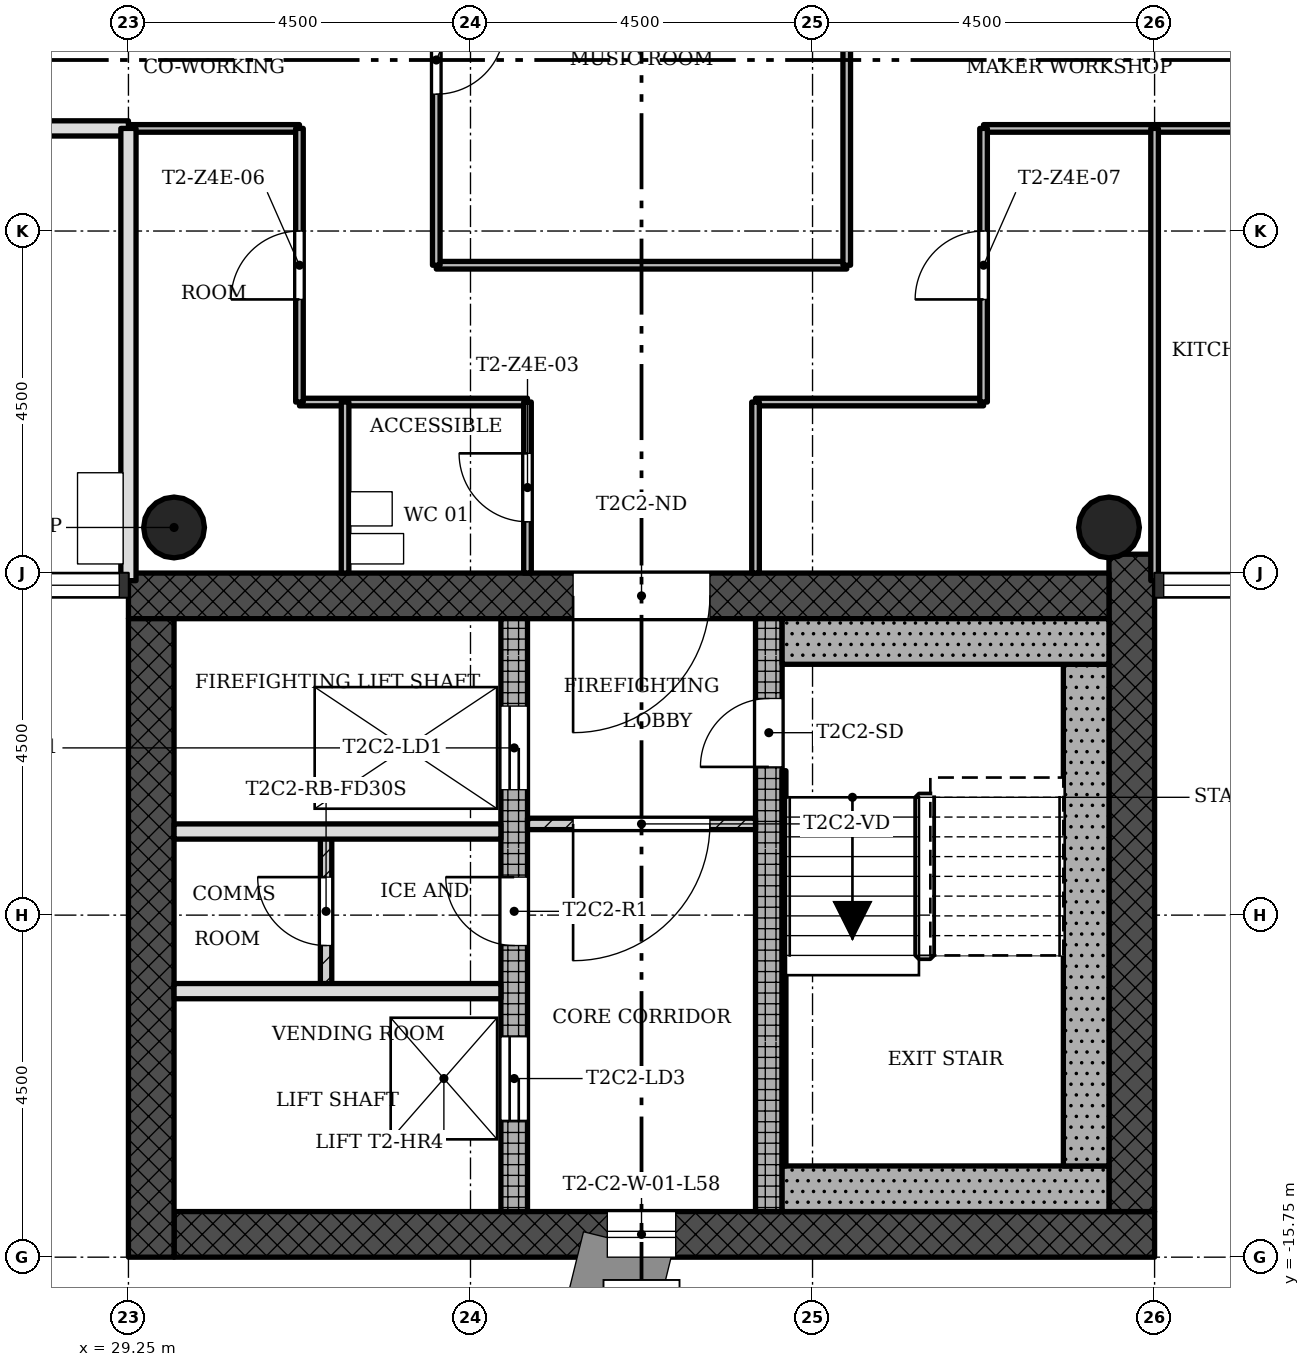
"""IFC4 building model, lengths in metres.
Left out: names, types, materials, properties, quantities, classifications, styles, units other than length and angle.
Written with IfcOpenShell. Run it as: python <this file> out.ifc"""

import sys

from ifc_helpers import new_model, si_unit, direction, frame, frame_2d, origin, origin_2d, place, context, subcontext, project, spatial, rectangle, hollow_circle, extrude, element, fill, save


model = new_model("IFC4")
c1 = context("Model", 3, precision=1e-05, world=origin(), true_north=direction((0.0, 1.0)))
c2 = subcontext(c1, "Body", "Model", "MODEL_VIEW")
j1 = project(units=[si_unit("LENGTHUNIT", "METRE"), si_unit("PLANEANGLEUNIT", "RADIAN")], contexts=[c1])
p1 = place(None, origin())
s1 = spatial("IfcSite", under=j1, at=p1, CompositionType="ELEMENT")
p2 = place(p1, origin())
s2 = spatial("IfcBuilding", under=s1, at=p2, CompositionType="ELEMENT")
p3 = place(p2, frame((0.0, 0.0, 209.6)))
s3 = spatial("IfcBuildingStorey", under=s2, at=p3, CompositionType="ELEMENT", Elevation=209.6)
p4 = place(p3, frame((29.85, -15.45, 0.0), z_axis=(0.0, 0.0, 1.0), x_axis=(1.0, 0.0, 0.0)))
e1 = element("IfcWall", 1, at=p4, inside=s3, PredefinedType="SHEAR", context=c2, shape_type="SweptSolid", body=[
    extrude(rectangle(XDim=12.9, YDim=0.6, at=frame_2d((6.45, 0.0))), origin(), (0.0, 0.0, 1.0), 3.4),
])
p5 = place(p4, frame((5.7, 0.0, 0.45)))
e2 = element("IfcOpeningElement", 2, at=p5, cuts=e1, PredefinedType="OPENING", context=c2, shape_type="SweptSolid", body=[
    extrude(rectangle(XDim=0.9, YDim=2.4, at=frame_2d((0.45, 1.2))), frame((0.0, 0.31, 0.0), z_axis=(0.0, -1.0, 0.0), x_axis=(1.0, 0.0, 0.0)), (0.0, 0.0, 1.0), 0.62),
])
p6 = place(p3, frame((42.45, -15.15, 0.0), z_axis=(0.0, 0.0, 1.0), x_axis=(0.0, 1.0, 0.0)))
e3 = element("IfcWall", 3, at=p6, inside=s3, PredefinedType="SHEAR", context=c2, shape_type="SweptSolid", body=[
    extrude(rectangle(XDim=8.648, YDim=0.6, at=frame_2d((4.324, 0.0))), origin(), (0.0, 0.0, 1.0), 3.4),
])
p7 = place(p3, frame((42.15, -7.05, 0.0), z_axis=(0.0, 0.0, 1.0), x_axis=(-1.0, 0.0, 0.0)))
e4 = element("IfcWall", 4, at=p7, inside=s3, PredefinedType="SHEAR", context=c2, shape_type="SweptSolid", body=[
    extrude(rectangle(XDim=12.9, YDim=0.6, at=frame_2d((6.45, 0.0))), origin(), (0.0, 0.0, 1.0), 3.4),
])
p8 = place(p7, frame((5.25, 0.0, 0.0)))
e5 = element("IfcOpeningElement", 5, at=p8, cuts=e4, PredefinedType="OPENING", context=c2, shape_type="SweptSolid", body=[
    extrude(rectangle(XDim=1.8, YDim=2.1, at=frame_2d((0.9, 1.05))), frame((0.0, 0.31, 0.0), z_axis=(0.0, -1.0, 0.0), x_axis=(1.0, 0.0, 0.0)), (0.0, 0.0, 1.0), 0.62),
])
p9 = place(p3, frame((29.55, -7.35, 0.0), z_axis=(0.0, 0.0, 1.0), x_axis=(0.0, -1.0, 0.0)))
e6 = element("IfcWall", 6, at=p9, inside=s3, PredefinedType="SHEAR", context=c2, shape_type="SweptSolid", body=[
    extrude(rectangle(XDim=8.4, YDim=0.6, at=frame_2d((4.2, 0.0))), origin(), (0.0, 0.0, 1.0), 3.4),
])
p10 = place(p3, frame((34.325, -15.15, 0.0), z_axis=(0.0, 0.0, 1.0), x_axis=(0.0, 1.0, 0.0)))
e7 = element("IfcWall", 7, at=p10, inside=s3, PredefinedType="SHEAR", context=c2, shape_type="SweptSolid", body=[
    extrude(rectangle(XDim=7.8, YDim=0.35, at=frame_2d((3.9, 0.0))), origin(), (0.0, 0.0, 1.0), 3.4),
])
p11 = place(p10, frame((5.55, 0.0, 0.0)))
e8 = element("IfcOpeningElement", 8, at=p11, cuts=e7, PredefinedType="OPENING", context=c2, shape_type="SweptSolid", body=[
    extrude(rectangle(XDim=1.1, YDim=2.1, at=frame_2d((0.55, 1.05))), frame((0.0, 0.185, 0.0), z_axis=(0.0, -1.0, 0.0), x_axis=(1.0, 0.0, 0.0)), (0.0, 0.0, 1.0), 0.37),
])
p12 = place(p10, frame((1.2, 0.0, 0.0)))
e9 = element("IfcOpeningElement", 9, at=p12, cuts=e7, PredefinedType="OPENING", context=c2, shape_type="SweptSolid", body=[
    extrude(rectangle(XDim=1.1, YDim=2.1, at=frame_2d((0.55, 1.05))), frame((0.0, 0.185, 0.0), z_axis=(0.0, -1.0, 0.0), x_axis=(1.0, 0.0, 0.0)), (0.0, 0.0, 1.0), 0.37),
])
p13 = place(p10, frame((3.5, 0.0, 0.0)))
e10 = element("IfcOpeningElement", 10, at=p13, cuts=e7, PredefinedType="OPENING", context=c2, shape_type="SweptSolid", body=[
    extrude(rectangle(XDim=0.9, YDim=2.1, at=frame_2d((0.45, 1.05))), frame((0.0, 0.185, 0.0), z_axis=(0.0, -1.0, 0.0), x_axis=(1.0, 0.0, 0.0)), (0.0, 0.0, 1.0), 0.37),
])
p14 = place(p3, frame((37.675, -15.15, 0.0), z_axis=(0.0, 0.0, 1.0), x_axis=(0.0, 1.0, 0.0)))
e11 = element("IfcWall", 11, at=p14, inside=s3, PredefinedType="SHEAR", context=c2, shape_type="SweptSolid", body=[
    extrude(rectangle(XDim=7.8, YDim=0.35, at=frame_2d((3.9, 0.0))), origin(), (0.0, 0.0, 1.0), 3.4),
])
p15 = place(p14, frame((5.85, 0.0, 0.0)))
e12 = element("IfcOpeningElement", 12, at=p15, cuts=e11, PredefinedType="OPENING", context=c2, shape_type="SweptSolid", body=[
    extrude(rectangle(XDim=0.9, YDim=2.1, at=frame_2d((0.45, 1.05))), frame((0.0, 0.185, 0.0), z_axis=(0.0, -1.0, 0.0), x_axis=(1.0, 0.0, 0.0)), (0.0, 0.0, 1.0), 0.37),
])
for number, where, z_axis, x_axis in (
    (13, (42.15, -6.15, 0.0), (0.0, 0.0, 1.0), (1.0, 0.0, 0.0)),
    (14, (29.85, -6.15, 0.0), (0.0, 0.0, 1.0), (1.0, 0.0, 0.0)),
):
    element("IfcColumn", number, at=place(p3, frame(where, z_axis=z_axis, x_axis=x_axis)), inside=s3, PredefinedType="COLUMN", context=c2, shape_type="SweptSolid", body=[
        extrude(hollow_circle(Radius=0.4, WallThickness=0.028, at=origin_2d()), origin(), (0.0, 0.0, 1.0), 3.4),
    ])
p16 = place(p3, frame((34.5, -10.05, 0.0), z_axis=(0.0, 0.0, 1.0), x_axis=(1.0, 0.0, 0.0)))
e15 = element("IfcWall", 15, at=p16, inside=s3, PredefinedType="PARTITIONING", context=c2, shape_type="SweptSolid", body=[
    extrude(rectangle(XDim=3.0, YDim=0.15, at=frame_2d((1.5, 0.0))), origin(), (0.0, 0.0, 1.0), 3.0),
])
p17 = place(p16, frame((0.6, 0.0, 0.0)))
e16 = element("IfcOpeningElement", 16, at=p17, cuts=e15, PredefinedType="OPENING", context=c2, shape_type="SweptSolid", body=[
    extrude(rectangle(XDim=1.8, YDim=2.1, at=frame_2d((0.9, 1.05))), frame((0.0, 0.085, 0.0), z_axis=(0.0, -1.0, 0.0), x_axis=(1.0, 0.0, 0.0)), (0.0, 0.0, 1.0), 0.17),
])
for number, where, z_axis, x_axis in (
    (17, (29.85, -12.25, 0.0), (0.0, 0.0, 1.0), (1.0, 0.0, 0.0)),
    (18, (29.85, -10.15, 0.0), (0.0, 0.0, 1.0), (1.0, 0.0, 0.0)),
):
    element("IfcWall", number, at=place(p3, frame(where, z_axis=z_axis, x_axis=x_axis)), inside=s3, PredefinedType="SOLIDWALL", context=c2, shape_type="SweptSolid", body=[
        extrude(rectangle(XDim=4.3, YDim=0.2, at=frame_2d((2.15, 0.0))), origin(), (0.0, 0.0, 1.0), 3.0),
    ])
p18 = place(p3, frame((31.85, -10.15, 0.0), z_axis=(0.0, 0.0, 1.0), x_axis=(0.0, -1.0, 0.0)))
e19 = element("IfcWall", 19, at=p18, inside=s3, PredefinedType="PARTITIONING", context=c2, shape_type="SweptSolid", body=[
    extrude(rectangle(XDim=2.1, YDim=0.15, at=frame_2d((1.05, 0.0))), origin(), (0.0, 0.0, 1.0), 3.0),
])
p19 = place(p18, frame((0.6, 0.0, 0.0)))
e20 = element("IfcOpeningElement", 20, at=p19, cuts=e19, PredefinedType="OPENING", context=c2, shape_type="SweptSolid", body=[
    extrude(rectangle(XDim=0.9, YDim=2.1, at=frame_2d((0.45, 1.05))), frame((0.0, 0.085, 0.0), z_axis=(0.0, -1.0, 0.0), x_axis=(1.0, 0.0, 0.0)), (0.0, 0.0, 1.0), 0.17),
])
for number, where, z_axis, x_axis in (
    (21, (40.5, -4.5, 0.0), (0.0, 0.0, 1.0), (-1.0, 0.0, 0.0)),
    (22, (34.5, -4.5, 0.0), (0.0, 0.0, 1.0), (-1.0, 0.0, 0.0)),
):
    element("IfcWall", number, at=place(p3, frame(where, z_axis=z_axis, x_axis=x_axis)), inside=s3, PredefinedType="PARTITIONING", context=c2, shape_type="SweptSolid", body=[
        extrude(rectangle(XDim=3.0, YDim=0.1, at=frame_2d((1.5, 0.0))), origin(), (0.0, 0.0, 1.0), 3.0),
    ])
p20 = place(p3, frame((38.7, -2.7, 0.0), z_axis=(0.0, 0.0, 1.0), x_axis=(-1.0, 0.0, 0.0)))
e23 = element("IfcWall", 23, at=p20, inside=s3, PredefinedType="PARTITIONING", context=c2, shape_type="SweptSolid", body=[
    extrude(rectangle(XDim=5.4, YDim=0.1, at=frame_2d((2.7, 0.0))), origin(), (0.0, 0.0, 1.0), 3.0),
])
p21 = place(p3, frame((44.55, -0.9, 0.0), z_axis=(0.0, 0.0, 1.0), x_axis=(-1.0, 0.0, 0.0)))
e24 = element("IfcWall", 24, at=p21, inside=s3, PredefinedType="PARTITIONING", context=c2, shape_type="SweptSolid", body=[
    extrude(rectangle(XDim=4.05, YDim=0.1, at=frame_2d((2.025, 0.0))), origin(), (0.0, 0.0, 1.0), 3.0),
])
p22 = place(p3, frame((31.5, -0.9, 0.0), z_axis=(0.0, 0.0, 1.0), x_axis=(-1.0, 0.0, 0.0)))
e25 = element("IfcWall", 25, at=p22, inside=s3, PredefinedType="PARTITIONING", context=c2, shape_type="SweptSolid", body=[
    extrude(rectangle(XDim=2.25, YDim=0.1, at=frame_2d((1.125, 0.0))), origin(), (0.0, 0.0, 1.0), 3.0),
])
p23 = place(p3, frame((29.25, -0.9, 0.0), z_axis=(0.0, 0.0, 1.0), x_axis=(-1.0, 0.0, 0.0)))
e26 = element("IfcWall", 26, at=p23, inside=s3, PredefinedType="SOLIDWALL", context=c2, shape_type="SweptSolid", body=[
    extrude(rectangle(XDim=9.0, YDim=0.2, at=frame_2d((4.5, 0.0))), origin(), (0.0, 0.0, 1.0), 3.0),
])
p24 = place(p23, frame((6.15, 0.0, 0.0)))
e27 = element("IfcOpeningElement", 27, at=p24, cuts=e26, PredefinedType="OPENING", context=c2, shape_type="SweptSolid", body=[
    extrude(rectangle(XDim=0.9, YDim=2.1, at=frame_2d((0.45, 1.05))), frame((0.0, 0.11, 0.0), z_axis=(0.0, -1.0, 0.0), x_axis=(1.0, 0.0, 0.0)), (0.0, 0.0, 1.0), 0.22),
])
p25 = place(p3, frame((42.75, -6.85, 0.0), z_axis=(0.0, 0.0, 1.0), x_axis=(0.0, 1.0, 0.0)))
e28 = element("IfcWall", 28, at=p25, inside=s3, PredefinedType="PARTITIONING", context=c2, shape_type="SweptSolid", body=[
    extrude(rectangle(XDim=5.95, YDim=0.1, at=frame_2d((2.975, 0.0))), origin(), (0.0, 0.0, 1.0), 3.0),
])
p26 = place(p3, frame((40.5, -4.5, 0.0), z_axis=(0.0, 0.0, 1.0), x_axis=(0.0, 1.0, 0.0)))
e29 = element("IfcWall", 29, at=p26, inside=s3, PredefinedType="PARTITIONING", context=c2, shape_type="SweptSolid", body=[
    extrude(rectangle(XDim=3.6, YDim=0.1, at=frame_2d((1.8, 0.0))), origin(), (0.0, 0.0, 1.0), 3.0),
])
p27 = place(p26, frame((1.35, 0.0, 0.0)))
e30 = element("IfcOpeningElement", 30, at=p27, cuts=e29, PredefinedType="OPENING", context=c2, shape_type="SweptSolid", body=[
    extrude(rectangle(XDim=0.9, YDim=2.1, at=frame_2d((0.45, 1.05))), frame((0.0, 0.06, 0.0), z_axis=(0.0, -1.0, 0.0), x_axis=(1.0, 0.0, 0.0)), (0.0, 0.0, 1.0), 0.12),
])
p28 = place(p3, frame((38.7, -2.7, 0.0), z_axis=(0.0, 0.0, 1.0), x_axis=(0.0, 1.0, 0.0)))
e31 = element("IfcWall", 31, at=p28, inside=s3, PredefinedType="PARTITIONING", context=c2, shape_type="SweptSolid", body=[
    extrude(rectangle(XDim=5.4, YDim=0.1, at=frame_2d((2.7, 0.0))), origin(), (0.0, 0.0, 1.0), 3.0),
])
p29 = place(p3, frame((37.5, -6.75, 0.0), z_axis=(0.0, 0.0, 1.0), x_axis=(0.0, 1.0, 0.0)))
e32 = element("IfcWall", 32, at=p29, inside=s3, PredefinedType="PARTITIONING", context=c2, shape_type="SweptSolid", body=[
    extrude(rectangle(XDim=2.25, YDim=0.1, at=frame_2d((1.125, 0.0))), origin(), (0.0, 0.0, 1.0), 3.0),
])
p30 = place(p3, frame((34.5, -6.75, 0.0), z_axis=(0.0, 0.0, 1.0), x_axis=(0.0, 1.0, 0.0)))
e33 = element("IfcWall", 33, at=p30, inside=s3, PredefinedType="PARTITIONING", context=c2, shape_type="SweptSolid", body=[
    extrude(rectangle(XDim=2.25, YDim=0.1, at=frame_2d((1.125, 0.0))), origin(), (0.0, 0.0, 1.0), 3.0),
])
p31 = place(p30, frame((0.675, 0.0, 0.0)))
e34 = element("IfcOpeningElement", 34, at=p31, cuts=e33, PredefinedType="OPENING", context=c2, shape_type="SweptSolid", body=[
    extrude(rectangle(XDim=0.9, YDim=2.1, at=frame_2d((0.45, 1.05))), frame((0.0, 0.06, 0.0), z_axis=(0.0, -1.0, 0.0), x_axis=(1.0, 0.0, 0.0)), (0.0, 0.0, 1.0), 0.12),
])
p32 = place(p3, frame((33.3, -2.7, 0.0), z_axis=(0.0, 0.0, 1.0), x_axis=(0.0, 1.0, 0.0)))
e35 = element("IfcWall", 35, at=p32, inside=s3, PredefinedType="PARTITIONING", context=c2, shape_type="SweptSolid", body=[
    extrude(rectangle(XDim=5.4, YDim=0.1, at=frame_2d((2.7, 0.0))), origin(), (0.0, 0.0, 1.0), 3.0),
])
p33 = place(p32, frame((2.25, 0.0, 0.0)))
e36 = element("IfcOpeningElement", 36, at=p33, cuts=e35, PredefinedType="OPENING", context=c2, shape_type="SweptSolid", body=[
    extrude(rectangle(XDim=0.9, YDim=2.1, at=frame_2d((0.45, 1.05))), frame((0.0, 0.06, 0.0), z_axis=(0.0, -1.0, 0.0), x_axis=(1.0, 0.0, 0.0)), (0.0, 0.0, 1.0), 0.12),
])
p34 = place(p3, frame((32.1, -6.75, 0.0), z_axis=(0.0, 0.0, 1.0), x_axis=(0.0, 1.0, 0.0)))
e37 = element("IfcWall", 37, at=p34, inside=s3, PredefinedType="PARTITIONING", context=c2, shape_type="SweptSolid", body=[
    extrude(rectangle(XDim=2.25, YDim=0.1, at=frame_2d((1.125, 0.0))), origin(), (0.0, 0.0, 1.0), 3.0),
])
p35 = place(p3, frame((31.5, -4.5, 0.0), z_axis=(0.0, 0.0, 1.0), x_axis=(0.0, 1.0, 0.0)))
e38 = element("IfcWall", 38, at=p35, inside=s3, PredefinedType="PARTITIONING", context=c2, shape_type="SweptSolid", body=[
    extrude(rectangle(XDim=3.6, YDim=0.1, at=frame_2d((1.8, 0.0))), origin(), (0.0, 0.0, 1.0), 3.0),
])
p36 = place(p35, frame((1.35, 0.0, 0.0)))
e39 = element("IfcOpeningElement", 39, at=p36, cuts=e38, PredefinedType="OPENING", context=c2, shape_type="SweptSolid", body=[
    extrude(rectangle(XDim=0.9, YDim=2.1, at=frame_2d((0.45, 1.05))), frame((0.0, 0.06, 0.0), z_axis=(0.0, -1.0, 0.0), x_axis=(1.0, 0.0, 0.0)), (0.0, 0.0, 1.0), 0.12),
])
p37 = place(p3, frame((29.25, -6.85, 0.0), z_axis=(0.0, 0.0, 1.0), x_axis=(0.0, 1.0, 0.0)))
e40 = element("IfcWall", 40, at=p37, inside=s3, PredefinedType="SOLIDWALL", context=c2, shape_type="SweptSolid", body=[
    extrude(rectangle(XDim=5.95, YDim=0.2, at=frame_2d((2.975, 0.0))), origin(), (0.0, 0.0, 1.0), 3.0),
])
p38 = place(p3, frame((37.85, -14.85, 0.0), z_axis=(0.0, 0.0, 1.0), x_axis=(1.0, 0.0, 0.0)))
e41 = element("IfcWall", 41, at=p38, inside=s3, PredefinedType="SHEAR", context=c2, shape_type="SweptSolid", body=[
    extrude(rectangle(XDim=4.3, YDim=0.6, at=frame_2d((2.15, 0.0))), origin(), (0.0, 0.0, 1.0), 3.4),
])
p39 = place(p3, frame((41.85, -7.95, 0.0), z_axis=(0.0, 0.0, 1.0), x_axis=(0.0, -1.0, 0.0)))
e42 = element("IfcWall", 42, at=p39, inside=s3, PredefinedType="SHEAR", context=c2, shape_type="SweptSolid", body=[
    extrude(rectangle(XDim=6.6, YDim=0.6, at=frame_2d((3.3, 0.0))), origin(), (0.0, 0.0, 1.0), 3.4),
])
p40 = place(p3, frame((37.85, -7.65, 0.0), z_axis=(0.0, 0.0, 1.0), x_axis=(1.0, 0.0, 0.0)))
e43 = element("IfcWall", 43, at=p40, inside=s3, PredefinedType="SHEAR", context=c2, shape_type="SweptSolid", body=[
    extrude(rectangle(XDim=4.3, YDim=0.6, at=frame_2d((2.15, 0.0))), origin(), (0.0, 0.0, 1.0), 3.4),
])
p41 = place(p3, frame((37.875, -9.35, 0.0), z_axis=(0.0, 0.0, 1.0), x_axis=(0.0, -1.0, 0.0)))
e44 = element("IfcWall", 44, at=p41, inside=s3, PredefinedType="SHEAR", context=c2, shape_type="SweptSolid", body=[
    extrude(rectangle(XDim=5.2, YDim=0.05, at=frame_2d((2.6, 0.0))), origin(), (0.0, 0.0, 1.0), 3.4),
])
p42 = place(p5, origin())
e45 = element("IfcWindow", 45, at=p42, inside=s3, PartitioningType="SINGLE_PANEL", PredefinedType="WINDOW", context=c2, shape_type="SweptSolid", body=[
    extrude(rectangle(XDim=0.9, YDim=2.4, at=frame_2d((0.45, 1.2))), frame((0.0, 0.03, 0.0), z_axis=(0.0, -1.0, 0.0), x_axis=(1.0, 0.0, 0.0)), (0.0, 0.0, 1.0), 0.06),
])
fill(e2, e45)
p43 = place(p17, origin())
e46 = element("IfcDoor", 46, at=p43, inside=s3, OperationType="SINGLE_SWING_LEFT", PredefinedType="DOOR", context=c2, shape_type="SweptSolid", body=[
    extrude(rectangle(XDim=1.8, YDim=2.1, at=frame_2d((0.9, 1.05))), frame((0.0, 0.025, 0.0), z_axis=(0.0, -1.0, 0.0), x_axis=(1.0, 0.0, 0.0)), (0.0, 0.0, 1.0), 0.05),
])
fill(e16, e46)
p44 = place(p19, origin())
e47 = element("IfcDoor", 47, at=p44, inside=s3, OperationType="SINGLE_SWING_LEFT", PredefinedType="DOOR", context=c2, shape_type="SweptSolid", body=[
    extrude(rectangle(XDim=0.9, YDim=2.1, at=frame_2d((0.45, 1.05))), frame((0.0, 0.025, 0.0), z_axis=(0.0, -1.0, 0.0), x_axis=(1.0, 0.0, 0.0)), (0.0, 0.0, 1.0), 0.05),
])
fill(e20, e47)
p45 = place(p33, origin())
e48 = element("IfcDoor", 48, at=p45, inside=s3, OperationType="SINGLE_SWING_RIGHT", PredefinedType="DOOR", context=c2, shape_type="SweptSolid", body=[
    extrude(rectangle(XDim=0.9, YDim=2.1, at=frame_2d((0.45, 1.05))), frame((0.0, 0.025, 0.0), z_axis=(0.0, -1.0, 0.0), x_axis=(1.0, 0.0, 0.0)), (0.0, 0.0, 1.0), 0.05),
])
fill(e36, e48)
p46 = place(p31, origin())
e49 = element("IfcDoor", 49, at=p46, inside=s3, OperationType="SINGLE_SWING_LEFT", PredefinedType="DOOR", context=c2, shape_type="SweptSolid", body=[
    extrude(rectangle(XDim=0.9, YDim=2.1, at=frame_2d((0.45, 1.05))), frame((0.0, 0.025, 0.0), z_axis=(0.0, -1.0, 0.0), x_axis=(1.0, 0.0, 0.0)), (0.0, 0.0, 1.0), 0.05),
])
fill(e34, e49)
p47 = place(p36, origin())
e50 = element("IfcDoor", 50, at=p47, inside=s3, OperationType="SINGLE_SWING_RIGHT", PredefinedType="DOOR", context=c2, shape_type="SweptSolid", body=[
    extrude(rectangle(XDim=0.9, YDim=2.1, at=frame_2d((0.45, 1.05))), frame((0.0, 0.025, 0.0), z_axis=(0.0, -1.0, 0.0), x_axis=(1.0, 0.0, 0.0)), (0.0, 0.0, 1.0), 0.05),
])
fill(e39, e50)
p48 = place(p27, origin())
e51 = element("IfcDoor", 51, at=p48, inside=s3, OperationType="SINGLE_SWING_RIGHT", PredefinedType="DOOR", context=c2, shape_type="SweptSolid", body=[
    extrude(rectangle(XDim=0.9, YDim=2.1, at=frame_2d((0.45, 1.05))), frame((0.0, 0.025, 0.0), z_axis=(0.0, -1.0, 0.0), x_axis=(1.0, 0.0, 0.0)), (0.0, 0.0, 1.0), 0.05),
])
fill(e30, e51)
p49 = place(p15, origin())
e52 = element("IfcDoor", 52, at=p49, inside=s3, OperationType="SINGLE_SWING_RIGHT", PredefinedType="DOOR", context=c2, shape_type="SweptSolid", body=[
    extrude(rectangle(XDim=0.9, YDim=2.1, at=frame_2d((0.45, 1.05))), frame((0.0, 0.025, 0.0), z_axis=(0.0, -1.0, 0.0), x_axis=(1.0, 0.0, 0.0)), (0.0, 0.0, 1.0), 0.05),
])
fill(e12, e52)
p50 = place(p11, origin())
e53 = element("IfcDoor", 53, at=p50, inside=s3, OperationType="SLIDING_TO_LEFT", PredefinedType="DOOR", context=c2, shape_type="SweptSolid", body=[
    extrude(rectangle(XDim=1.1, YDim=2.1, at=frame_2d((0.55, 1.05))), frame((0.0, 0.025, 0.0), z_axis=(0.0, -1.0, 0.0), x_axis=(1.0, 0.0, 0.0)), (0.0, 0.0, 1.0), 0.05),
])
fill(e8, e53)
p51 = place(p12, origin())
e54 = element("IfcDoor", 54, at=p51, inside=s3, OperationType="SLIDING_TO_LEFT", PredefinedType="DOOR", context=c2, shape_type="SweptSolid", body=[
    extrude(rectangle(XDim=1.1, YDim=2.1, at=frame_2d((0.55, 1.05))), frame((0.0, 0.025, 0.0), z_axis=(0.0, -1.0, 0.0), x_axis=(1.0, 0.0, 0.0)), (0.0, 0.0, 1.0), 0.05),
])
fill(e9, e54)
p52 = place(p13, origin())
e55 = element("IfcDoor", 55, at=p52, inside=s3, OperationType="SINGLE_SWING_LEFT", PredefinedType="DOOR", context=c2, shape_type="SweptSolid", body=[
    extrude(rectangle(XDim=0.9, YDim=2.1, at=frame_2d((0.45, 1.05))), frame((0.0, 0.025, 0.0), z_axis=(0.0, -1.0, 0.0), x_axis=(1.0, 0.0, 0.0)), (0.0, 0.0, 1.0), 0.05),
])
fill(e10, e55)
p53 = place(p8, origin())
e56 = element("IfcDoor", 56, at=p53, inside=s3, OperationType="SINGLE_SWING_LEFT", PredefinedType="DOOR", context=c2, shape_type="SweptSolid", body=[
    extrude(rectangle(XDim=1.8, YDim=2.1, at=frame_2d((0.9, 1.05))), frame((0.0, 0.025, 0.0), z_axis=(0.0, -1.0, 0.0), x_axis=(1.0, 0.0, 0.0)), (0.0, 0.0, 1.0), 0.05),
])
fill(e5, e56)
save(model, sys.argv[1])
